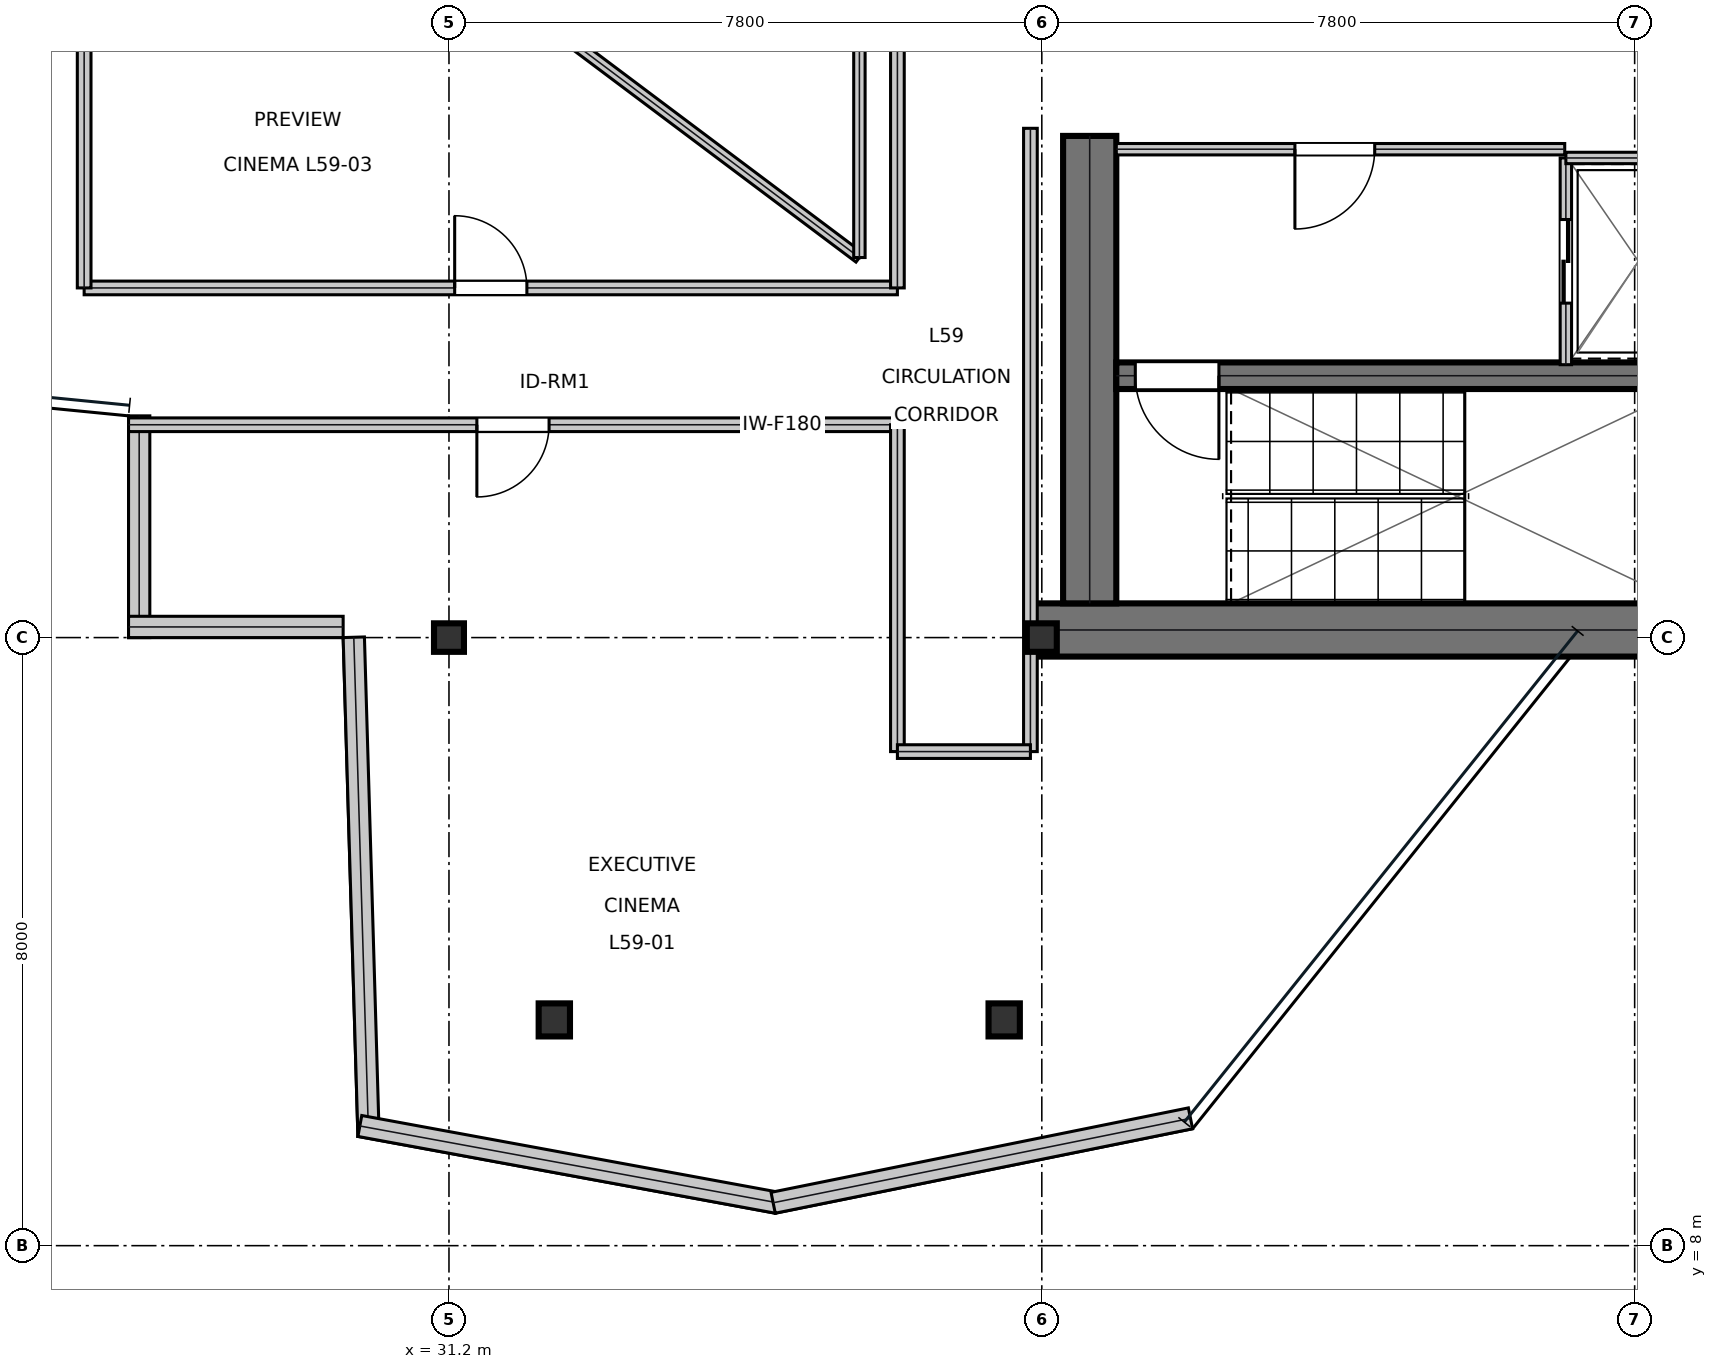
"""IFC4 building model, lengths in metres.
Left out: names, types, materials, properties, quantities, classifications, styles, units other than length and angle.
Written with IfcOpenShell. Run it as: python <this file> out.ifc"""

import sys

from ifc_helpers import new_model, si_unit, direction, frame, frame_2d, origin, origin_2d, place, context, subcontext, project, spatial, rectangle, i_section, extrude, element, fill, save


model = new_model("IFC4")
c1 = context("Model", 3, precision=1e-05, world=origin(), true_north=direction((0.0, 1.0)))
c2 = subcontext(c1, "Body", "Model", "MODEL_VIEW")
j1 = project(units=[si_unit("LENGTHUNIT", "METRE"), si_unit("PLANEANGLEUNIT", "RADIAN")], contexts=[c1])
p1 = place(None, origin())
s1 = spatial("IfcSite", under=j1, at=p1, CompositionType="ELEMENT")
p2 = place(p1, origin())
s2 = spatial("IfcBuilding", under=s1, at=p2, CompositionType="ELEMENT")
p3 = place(p2, frame((0.0, 0.0, 252.6)))
s3 = spatial("IfcBuildingStorey", under=s2, at=p3, CompositionType="ELEMENT", Elevation=252.6)
p4 = place(p3, frame((38.8, 16.1, 0.0), z_axis=(0.0, 0.0, 1.0), x_axis=(1.0, 0.0, 0.0)))
e1 = element("IfcWall", 1, at=p4, inside=s3, PredefinedType="SHEAR", context=c2, shape_type="SweptSolid", body=[
    extrude(rectangle(XDim=16.0, YDim=0.7, at=frame_2d((8.0, 0.0))), origin(), (0.0, 0.0, 1.0), 3.73),
])
p5 = place(p3, frame((39.63, 16.45, 0.0), z_axis=(0.0, 0.0, 1.0), x_axis=(0.0, 1.0, 0.0)))
e2 = element("IfcWall", 2, at=p5, inside=s3, PredefinedType="SHEAR", context=c2, shape_type="SweptSolid", body=[
    extrude(rectangle(XDim=6.15, YDim=0.7, at=frame_2d((3.075, 0.0))), origin(), (0.0, 0.0, 1.0), 3.73),
])
p6 = place(p3, frame((39.98, 19.445, 0.0), z_axis=(0.0, 0.0, 1.0), x_axis=(1.0, 0.0, 0.0)))
e3 = element("IfcWall", 3, at=p6, inside=s3, PredefinedType="SHEAR", context=c2, shape_type="SweptSolid", body=[
    extrude(rectangle(XDim=7.71, YDim=0.35, at=frame_2d((3.855, 0.0))), origin(), (0.0, 0.0, 1.0), 3.73),
])
p7 = place(p6, frame((0.25, 0.0, 0.0)))
e4 = element("IfcOpeningElement", 4, at=p7, cuts=e3, PredefinedType="OPENING", context=c2, shape_type="SweptSolid", body=[
    extrude(rectangle(XDim=1.1, YDim=2.15, at=frame_2d((0.55, 1.075))), frame((0.0, 0.185, 0.0), z_axis=(0.0, -1.0, 0.0), x_axis=(1.0, 0.0, 0.0)), (0.0, 0.0, 1.0), 0.37),
])
for number, where, z_axis, x_axis in (
    (5, (31.2, 16.0, 0.0), (0.0, 0.0, 1.0), (1.0, 0.0, 0.0)),
    (6, (39.0, 16.0, 0.0), (0.0, 0.0, 1.0), (1.0, 0.0, 0.0)),
):
    element("IfcColumn", number, at=place(p3, frame(where, z_axis=z_axis, x_axis=x_axis)), inside=s3, PredefinedType="COLUMN", context=c2, shape_type="SweptSolid", body=[
        extrude(i_section(OverallWidth=0.394, OverallDepth=0.375, WebThickness=0.017, FlangeThickness=0.028, at=origin_2d()), origin(), (0.0, 0.0, 1.0), 4.044),
    ])
p8 = place(p3, frame((32.586, 10.97, 0.016), z_axis=(0.009051266318, 0.01943896122, 0.999770074249), x_axis=(-0.90654468166, 0.422109867398, 0.0)))
e7 = element("IfcColumn", 7, at=p8, inside=s3, PredefinedType="COLUMN", context=c2, shape_type="SweptSolid", body=[
    extrude(i_section(OverallWidth=0.412, OverallDepth=0.435, WebThickness=0.036, FlangeThickness=0.058, at=origin_2d()), origin(), (0.0, 0.0, 1.0), 4.019),
])
p9 = place(p3, frame((38.505, 10.97, 0.016), z_axis=(-0.003219693154, 0.019439656781, 0.999805847813), x_axis=(-0.986560065704, -0.163399010882, 0.0)))
e8 = element("IfcColumn", 8, at=p9, inside=s3, PredefinedType="COLUMN", context=c2, shape_type="SweptSolid", body=[
    extrude(i_section(OverallWidth=0.412, OverallDepth=0.435, WebThickness=0.036, FlangeThickness=0.058, at=origin_2d()), origin(), (0.0, 0.0, 1.0), 4.019),
])
p10 = place(p3, frame((27.124, 18.917, 0.0), z_axis=(0.0, 0.0, 1.0), x_axis=(0.0, -1.0, 0.0)))
e9 = element("IfcWall", 9, at=p10, inside=s3, PredefinedType="STANDARD", context=c2, shape_type="SweptSolid", body=[
    extrude(rectangle(XDim=2.917, YDim=0.28, at=frame_2d((1.458, 0.0))), origin(), (0.0, 0.0, 1.0), 3.259),
])
p11 = place(p3, frame((26.984, 16.14, 0.0), z_axis=(0.0, 0.0, 1.0), x_axis=(1.0, 0.0, 0.0)))
e10 = element("IfcWall", 10, at=p11, inside=s3, PredefinedType="STANDARD", context=c2, shape_type="SweptSolid", body=[
    extrude(rectangle(XDim=2.824, YDim=0.28, at=frame_2d((1.412, 0.0))), origin(), (0.0, 0.0, 1.0), 3.73),
])
p12 = place(p3, frame((29.948, 16.004, 0.0), z_axis=(0.0, 0.0, 1.0), x_axis=(0.029597919089, -0.999561885621, 0.0)))
e11 = element("IfcWall", 11, at=p12, inside=s3, PredefinedType="STANDARD", context=c2, shape_type="SweptSolid", body=[
    extrude(rectangle(XDim=6.566, YDim=0.28, at=frame_2d((3.283, 0.0))), origin(), (0.0, 0.0, 1.0), 3.73),
])
p13 = place(p3, frame((30.027, 9.575, 0.0), z_axis=(0.0, 0.0, 1.0), x_axis=(0.983500515457, -0.180905323571, 0.0)))
e12 = element("IfcWall", 12, at=p13, inside=s3, PredefinedType="STANDARD", context=c2, shape_type="SweptSolid", body=[
    extrude(rectangle(XDim=5.583, YDim=0.28, at=frame_2d((2.792, 0.0))), origin(), (0.0, 0.0, 1.0), 3.73),
])
p14 = place(p3, frame((35.465, 8.564, 0.0), z_axis=(0.0, 0.0, 1.0), x_axis=(0.980137399087, 0.198319638238, 0.0)))
e13 = element("IfcWall", 13, at=p14, inside=s3, PredefinedType="STANDARD", context=c2, shape_type="SweptSolid", body=[
    extrude(rectangle(XDim=5.603, YDim=0.28, at=frame_2d((2.801, 0.0))), origin(), (0.0, 0.0, 1.0), 3.73),
])
p15 = place(p3, frame((39.98, 22.425, 0.0), z_axis=(0.0, 0.0, 1.0), x_axis=(1.0, 0.0, 0.0)))
e14 = element("IfcWall", 14, at=p15, inside=s3, PredefinedType="PARTITIONING", context=c2, shape_type="SweptSolid", body=[
    extrude(rectangle(XDim=5.9, YDim=0.15, at=frame_2d((2.95, 0.0))), origin(), (0.0, 0.0, 1.0), 3.73),
])
p16 = place(p15, frame((2.35, 0.0, 0.0)))
e15 = element("IfcOpeningElement", 15, at=p16, cuts=e14, PredefinedType="OPENING", context=c2, shape_type="SweptSolid", body=[
    extrude(rectangle(XDim=1.05, YDim=2.15, at=frame_2d((0.525, 1.075))), frame((0.0, 0.085, 0.0), z_axis=(0.0, -1.0, 0.0), x_axis=(1.0, 0.0, 0.0)), (0.0, 0.0, 1.0), 0.17),
])
p17 = place(p3, frame((45.895, 19.59, 0.0), z_axis=(0.0, 0.0, 1.0), x_axis=(0.0, 1.0, 0.0)))
e16 = element("IfcWall", 16, at=p17, inside=s3, PredefinedType="PARTITIONING", context=c2, shape_type="SweptSolid", body=[
    extrude(rectangle(XDim=2.72, YDim=0.15, at=frame_2d((1.36, 0.0))), origin(), (0.0, 0.0, 1.0), 3.73),
])
p18 = place(p17, frame((0.81, 0.0, 0.0)))
e17 = element("IfcOpeningElement", 17, at=p18, cuts=e16, PredefinedType="OPENING", context=c2, shape_type="SweptSolid", body=[
    extrude(rectangle(XDim=1.1, YDim=2.15, at=frame_2d((0.55, 1.075))), frame((0.0, 0.085, 0.0), z_axis=(0.0, -1.0, 0.0), x_axis=(1.0, 0.0, 0.0)), (0.0, 0.0, 1.0), 0.17),
])
p19 = place(p3, frame((45.895, 22.31, 0.0), z_axis=(0.0, 0.0, 1.0), x_axis=(1.0, 0.0, 0.0)))
e18 = element("IfcWall", 18, at=p19, inside=s3, PredefinedType="PARTITIONING", context=c2, shape_type="SweptSolid", body=[
    extrude(rectangle(XDim=1.915, YDim=0.15, at=frame_2d((0.958, 0.0))), origin(), (0.0, 0.0, 1.0), 3.73),
])
p20 = place(p3, frame((26.984, 18.8, 0.0), z_axis=(0.0, 0.0, 1.0), x_axis=(1.0, 0.0, 0.0)))
e19 = element("IfcWall", 19, at=p20, inside=s3, PredefinedType="SOLIDWALL", context=c2, shape_type="SweptSolid", body=[
    extrude(rectangle(XDim=10.116, YDim=0.18, at=frame_2d((5.058, 0.0))), origin(), (0.0, 0.0, 1.0), 3.181),
])
p21 = place(p20, frame((4.583, 0.0, 0.0)))
e20 = element("IfcOpeningElement", 20, at=p21, cuts=e19, PredefinedType="OPENING", context=c2, shape_type="SweptSolid", body=[
    extrude(rectangle(XDim=0.95, YDim=2.15, at=frame_2d((0.475, 1.075))), frame((0.0, 0.1, 0.0), z_axis=(0.0, -1.0, 0.0), x_axis=(1.0, 0.0, 0.0)), (0.0, 0.0, 1.0), 0.2),
])
p22 = place(p3, frame((26.4, 20.6, 0.0), z_axis=(0.0, 0.0, 1.0), x_axis=(1.0, 0.0, 0.0)))
e21 = element("IfcWall", 21, at=p22, inside=s3, PredefinedType="SOLIDWALL", context=c2, shape_type="SweptSolid", body=[
    extrude(rectangle(XDim=10.7, YDim=0.18, at=frame_2d((5.35, 0.0))), origin(), (0.0, 0.0, 1.0), 3.181),
])
p23 = place(p22, frame((4.875, 0.0, 0.0)))
e22 = element("IfcOpeningElement", 22, at=p23, cuts=e21, PredefinedType="OPENING", context=c2, shape_type="SweptSolid", body=[
    extrude(rectangle(XDim=0.95, YDim=2.15, at=frame_2d((0.475, 1.075))), frame((0.0, 0.1, 0.0), z_axis=(0.0, -1.0, 0.0), x_axis=(1.0, 0.0, 0.0)), (0.0, 0.0, 1.0), 0.2),
])
p24 = place(p3, frame((38.85, 14.5, 0.0), z_axis=(0.0, 0.0, 1.0), x_axis=(0.0, 1.0, 0.0)))
e23 = element("IfcWall", 23, at=p24, inside=s3, PredefinedType="SOLIDWALL", context=c2, shape_type="SweptSolid", body=[
    extrude(rectangle(XDim=8.2, YDim=0.18, at=frame_2d((4.1, 0.0))), origin(), (0.0, 0.0, 1.0), 3.181),
])
p25 = place(p3, frame((37.1, 14.5, 0.0), z_axis=(0.0, 0.0, 1.0), x_axis=(0.0, 1.0, 0.0)))
e24 = element("IfcWall", 24, at=p25, inside=s3, PredefinedType="SOLIDWALL", context=c2, shape_type="SweptSolid", body=[
    extrude(rectangle(XDim=4.3, YDim=0.18, at=frame_2d((2.15, 0.0))), origin(), (0.0, 0.0, 1.0), 3.181),
])
p26 = place(p3, frame((37.1, 14.5, 0.0), z_axis=(0.0, 0.0, 1.0), x_axis=(1.0, 0.0, 0.0)))
e25 = element("IfcWall", 25, at=p26, inside=s3, PredefinedType="SOLIDWALL", context=c2, shape_type="SweptSolid", body=[
    extrude(rectangle(XDim=1.75, YDim=0.18, at=frame_2d((0.875, 0.0))), origin(), (0.0, 0.0, 1.0), 3.181),
])
p27 = place(p3, frame((26.4, 20.6, 0.0), z_axis=(0.0, 0.0, 1.0), x_axis=(0.0, 1.0, 0.0)))
e26 = element("IfcWall", 26, at=p27, inside=s3, PredefinedType="SOLIDWALL", context=c2, shape_type="SweptSolid", body=[
    extrude(rectangle(XDim=4.023, YDim=0.18, at=frame_2d((2.011, 0.0))), origin(), (0.0, 0.0, 1.0), 3.181),
])
p28 = place(p3, frame((37.1, 20.6, 0.0), z_axis=(0.0, 0.0, 1.0), x_axis=(0.0, 1.0, 0.0)))
e27 = element("IfcWall", 27, at=p28, inside=s3, PredefinedType="SOLIDWALL", context=c2, shape_type="SweptSolid", body=[
    extrude(rectangle(XDim=4.023, YDim=0.18, at=frame_2d((2.011, 0.0))), origin(), (0.0, 0.0, 1.0), 3.73),
])
p29 = place(p3, frame((32.6, 24.0, 0.0), z_axis=(0.0, 0.0, 1.0), x_axis=(0.8, -0.6, 0.0)))
e28 = element("IfcWall", 28, at=p29, inside=s3, PredefinedType="MOVABLE", context=c2, shape_type="SweptSolid", body=[
    extrude(rectangle(XDim=5.0, YDim=0.15, at=frame_2d((2.5, 0.0))), origin(), (0.0, 0.0, 1.0), 3.73),
])
p30 = place(p3, frame((36.6, 21.0, 0.0), z_axis=(0.0, 0.0, 1.0), x_axis=(0.0, 1.0, 0.0)))
e29 = element("IfcWall", 29, at=p30, inside=s3, PredefinedType="MOVABLE", context=c2, shape_type="SweptSolid", body=[
    extrude(rectangle(XDim=6.0, YDim=0.15, at=frame_2d((3.0, 0.0))), origin(), (0.0, 0.0, 1.0), 3.73),
])
p31 = place(p16, frame((1.05, 0.0, 0.0), z_axis=(0.0, 0.0, 1.0), x_axis=(-1.0, 0.0, 0.0)))
e30 = element("IfcDoor", 30, at=p31, inside=s3, OperationType="SINGLE_SWING_RIGHT", PredefinedType="DOOR", context=c2, shape_type="SweptSolid", body=[
    extrude(rectangle(XDim=1.05, YDim=2.15, at=frame_2d((0.525, 1.075))), frame((0.0, 0.025, 0.0), z_axis=(0.0, -1.0, 0.0), x_axis=(1.0, 0.0, 0.0)), (0.0, 0.0, 1.0), 0.05),
])
fill(e15, e30)
p32 = place(p18, frame((1.1, 0.0, 0.0), z_axis=(0.0, 0.0, 1.0), x_axis=(-1.0, 0.0, 0.0)))
e31 = element("IfcDoor", 31, at=p32, inside=s3, OperationType="DOUBLE_DOOR_SLIDING", PredefinedType="DOOR", context=c2, shape_type="SweptSolid", body=[
    extrude(rectangle(XDim=1.1, YDim=2.15, at=frame_2d((0.55, 1.075))), frame((0.0, 0.025, 0.0), z_axis=(0.0, -1.0, 0.0), x_axis=(1.0, 0.0, 0.0)), (0.0, 0.0, 1.0), 0.05),
])
fill(e17, e31)
p33 = place(p21, frame((0.95, 0.0, 0.0), z_axis=(0.0, 0.0, 1.0), x_axis=(-1.0, 0.0, 0.0)))
e32 = element("IfcDoor", 32, at=p33, inside=s3, OperationType="SINGLE_SWING_RIGHT", PredefinedType="DOOR", context=c2, shape_type="SweptSolid", body=[
    extrude(rectangle(XDim=0.95, YDim=2.15, at=frame_2d((0.475, 1.075))), frame((0.0, 0.025, 0.0), z_axis=(0.0, -1.0, 0.0), x_axis=(1.0, 0.0, 0.0)), (0.0, 0.0, 1.0), 0.05),
])
fill(e20, e32)
p34 = place(p23, origin())
e33 = element("IfcDoor", 33, at=p34, inside=s3, OperationType="SINGLE_SWING_LEFT", PredefinedType="DOOR", context=c2, shape_type="SweptSolid", body=[
    extrude(rectangle(XDim=0.95, YDim=2.15, at=frame_2d((0.475, 1.075))), frame((0.0, 0.025, 0.0), z_axis=(0.0, -1.0, 0.0), x_axis=(1.0, 0.0, 0.0)), (0.0, 0.0, 1.0), 0.05),
])
fill(e22, e33)
p35 = place(p7, frame((1.1, 0.0, 0.0), z_axis=(0.0, 0.0, 1.0), x_axis=(-1.0, 0.0, 0.0)))
e34 = element("IfcDoor", 34, at=p35, inside=s3, OperationType="SINGLE_SWING_LEFT", PredefinedType="DOOR", context=c2, shape_type="SweptSolid", body=[
    extrude(rectangle(XDim=1.1, YDim=2.15, at=frame_2d((0.55, 1.075))), frame((0.0, 0.025, 0.0), z_axis=(0.0, -1.0, 0.0), x_axis=(1.0, 0.0, 0.0)), (0.0, 0.0, 1.0), 0.05),
])
fill(e4, e34)
save(model, sys.argv[1])
